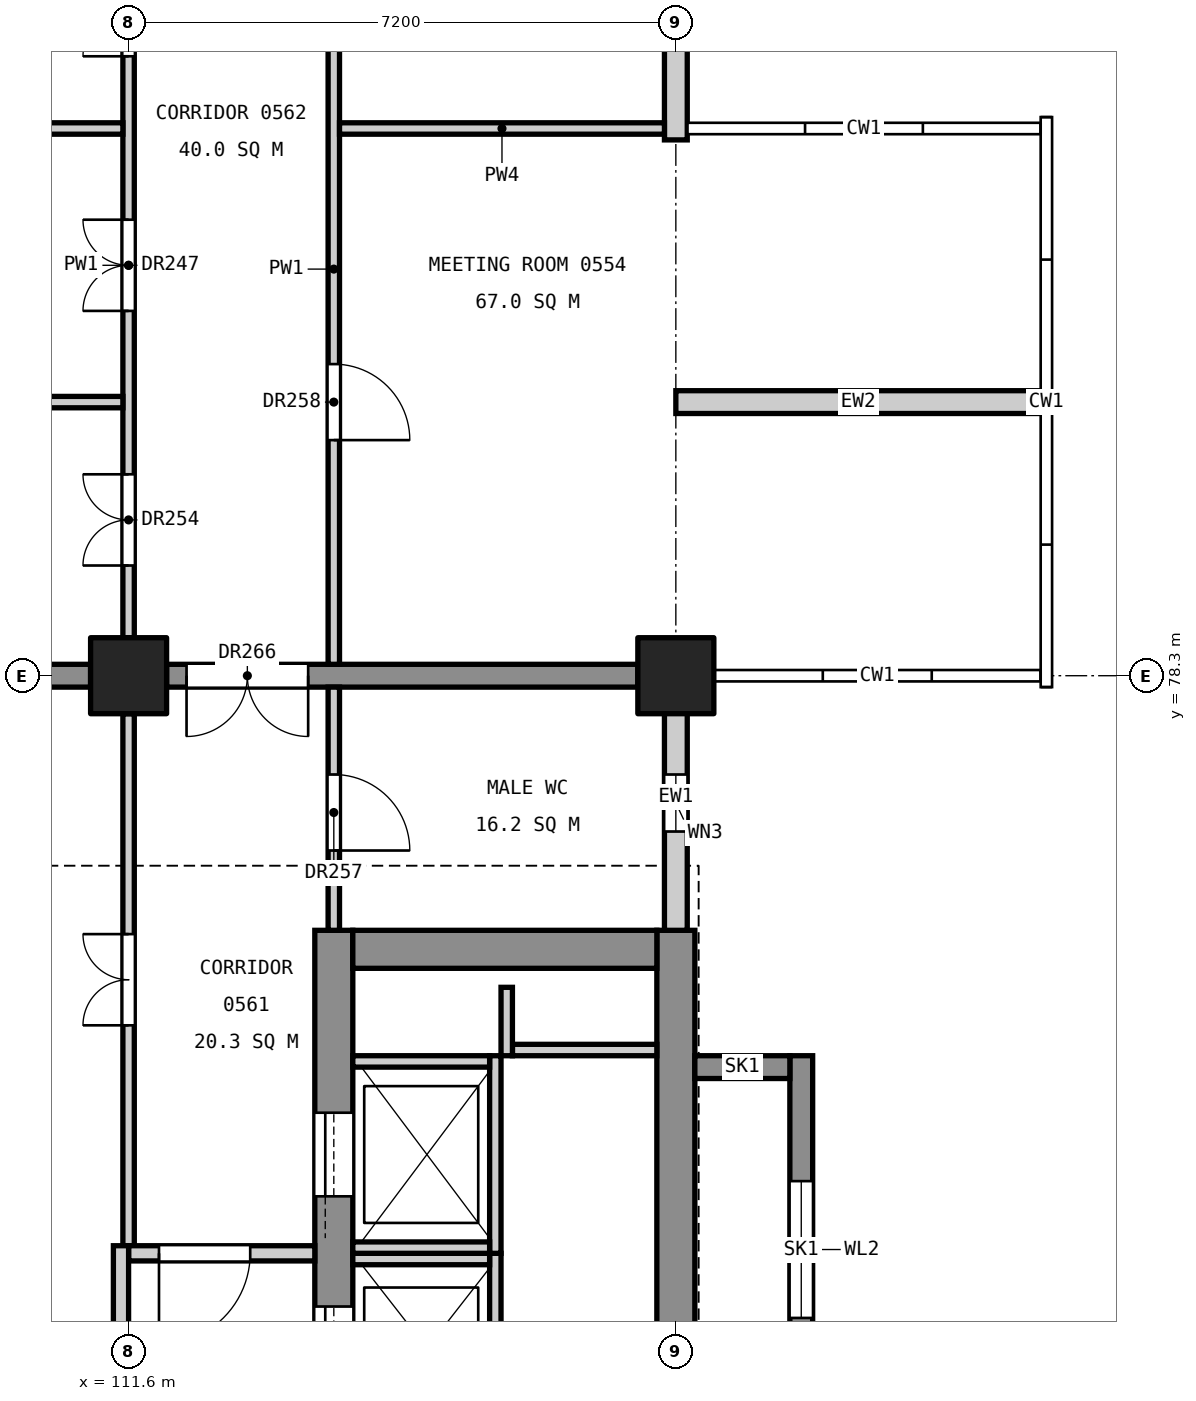
"""IFC4 building model, lengths in metres.
Left out: names, types, materials, properties, quantities, classifications, styles, units other than length and angle.
Written with IfcOpenShell. Run it as: python <this file> out.ifc"""

import sys

from ifc_helpers import new_model, si_unit, direction, frame, frame_2d, origin, origin_2d, place, context, subcontext, project, spatial, rectangle, extrude, element, fill, save


model = new_model("IFC4")
c1 = context("Model", 3, precision=1e-05, world=origin(), true_north=direction((0.0, 1.0)))
c2 = subcontext(c1, "Body", "Model", "MODEL_VIEW")
j1 = project(units=[si_unit("LENGTHUNIT", "METRE"), si_unit("PLANEANGLEUNIT", "RADIAN")], contexts=[c1])
p1 = place(None, origin())
s1 = spatial("IfcSite", under=j1, at=p1, CompositionType="ELEMENT")
p2 = place(p1, origin())
s2 = spatial("IfcBuilding", under=s1, at=p2, CompositionType="ELEMENT")
p3 = place(p2, frame((0.0, 0.0, 27.0)))
s3 = spatial("IfcBuildingStorey", under=s2, at=p3, CompositionType="ELEMENT", Elevation=27.0)
for number, where, z_axis, x_axis in (
    (1, (118.8, 78.3, 0.0), (0.0, 0.0, 1.0), (1.0, 0.0, 0.0)),
    (2, (111.6, 78.3, 0.0), (0.0, 0.0, 1.0), (1.0, 0.0, 0.0)),
):
    element("IfcColumn", number, at=place(p3, frame(where, z_axis=z_axis, x_axis=x_axis)), inside=s3, PredefinedType="COLUMN", context=c2, shape_type="SweptSolid", body=[
        extrude(rectangle(XDim=1.0, YDim=1.0, at=origin_2d()), origin(), (0.0, 0.0, 1.0), 4.8),
    ])
p4 = place(p3, frame((118.8, 60.05, 0.0), z_axis=(0.0, 0.0, 1.0), x_axis=(0.0, 1.0, 0.0)))
e3 = element("IfcWall", 3, at=p4, inside=s3, PredefinedType="SHEAR", context=c2, shape_type="SweptSolid", body=[
    extrude(rectangle(XDim=14.9, YDim=0.5, at=frame_2d((7.45, 0.0))), origin(), (0.0, 0.0, 1.0), 4.55),
])
p5 = place(p4, frame((6.16, 0.0, 3.4)))
e4 = element("IfcOpeningElement", 4, at=p5, cuts=e3, PredefinedType="OPENING", context=c2, shape_type="SweptSolid", body=[
    extrude(rectangle(XDim=1.2, YDim=0.9, at=frame_2d((0.6, 0.45))), frame((0.0, 0.26, 0.0), z_axis=(0.0, -1.0, 0.0), x_axis=(1.0, 0.0, 0.0)), (0.0, 0.0, 1.0), 0.52),
])
p6 = place(p3, frame((114.3, 60.05, 0.0), z_axis=(0.0, 0.0, 1.0), x_axis=(0.0, 1.0, 0.0)))
e5 = element("IfcWall", 5, at=p6, inside=s3, PredefinedType="SHEAR", context=c2, shape_type="SweptSolid", body=[
    extrude(rectangle(XDim=14.9, YDim=0.5, at=frame_2d((7.45, 0.0))), origin(), (0.0, 0.0, 1.0), 4.55),
])
p7 = place(p6, frame((0.55, 0.0, 0.0)))
e6 = element("IfcOpeningElement", 6, at=p7, cuts=e5, PredefinedType="OPENING", context=c2, shape_type="SweptSolid", body=[
    extrude(rectangle(XDim=1.4, YDim=2.1, at=frame_2d((0.7, 1.05))), frame((0.0, 0.26, 0.0), z_axis=(0.0, -1.0, 0.0), x_axis=(1.0, 0.0, 0.0)), (0.0, 0.0, 1.0), 0.52),
])
p8 = place(p6, frame((8.85, 0.0, 0.0)))
e7 = element("IfcOpeningElement", 7, at=p8, cuts=e5, PredefinedType="OPENING", context=c2, shape_type="SweptSolid", body=[
    extrude(rectangle(XDim=1.1, YDim=2.1, at=frame_2d((0.55, 1.05))), frame((0.0, 0.26, 0.0), z_axis=(0.0, -1.0, 0.0), x_axis=(1.0, 0.0, 0.0)), (0.0, 0.0, 1.0), 0.52),
])
p9 = place(p6, frame((11.4, 0.0, 0.0)))
e8 = element("IfcOpeningElement", 8, at=p9, cuts=e5, PredefinedType="OPENING", context=c2, shape_type="SweptSolid", body=[
    extrude(rectangle(XDim=1.1, YDim=2.1, at=frame_2d((0.55, 1.05))), frame((0.0, 0.26, 0.0), z_axis=(0.0, -1.0, 0.0), x_axis=(1.0, 0.0, 0.0)), (0.0, 0.0, 1.0), 0.52),
])
p10 = place(p3, frame((118.55, 74.7, 0.0), z_axis=(0.0, 0.0, 1.0), x_axis=(-1.0, 0.0, 0.0)))
e9 = element("IfcWall", 9, at=p10, inside=s3, PredefinedType="SHEAR", context=c2, shape_type="SweptSolid", body=[
    extrude(rectangle(XDim=4.0, YDim=0.5, at=frame_2d((2.0, 0.0))), origin(), (0.0, 0.0, 1.0), 4.55),
])
p11 = place(p3, frame((120.45, 68.2, 0.0), z_axis=(0.0, 0.0, 1.0), x_axis=(0.0, 1.0, 0.0)))
e10 = element("IfcWall", 10, at=p11, inside=s3, PredefinedType="SHEAR", context=c2, shape_type="SweptSolid", body=[
    extrude(rectangle(XDim=5.1, YDim=0.3, at=frame_2d((2.55, 0.0))), origin(), (0.0, 0.0, 1.0), 4.8),
])
p12 = place(p11, frame((1.65, 0.0, 3.0)))
e11 = element("IfcOpeningElement", 11, at=p12, cuts=e10, PredefinedType="OPENING", context=c2, shape_type="SweptSolid", body=[
    extrude(rectangle(XDim=1.8, YDim=1.2, at=frame_2d((0.9, 0.6))), frame((0.0, 0.16, 0.0), z_axis=(0.0, -1.0, 0.0), x_axis=(1.0, 0.0, 0.0)), (0.0, 0.0, 1.0), 0.32),
])
p13 = place(p3, frame((119.05, 73.15, 0.0), z_axis=(0.0, 0.0, 1.0), x_axis=(1.0, 0.0, 0.0)))
e12 = element("IfcWall", 12, at=p13, inside=s3, PredefinedType="SHEAR", context=c2, shape_type="SweptSolid", body=[
    extrude(rectangle(XDim=1.25, YDim=0.3, at=frame_2d((0.625, 0.0))), origin(), (0.0, 0.0, 1.0), 4.8),
])
p14 = place(p3, frame((118.3, 78.3, 0.0), z_axis=(0.0, 0.0, 1.0), x_axis=(-1.0, 0.0, 0.0)))
e13 = element("IfcWall", 13, at=p14, inside=s3, PredefinedType="SHEAR", context=c2, shape_type="SweptSolid", body=[
    extrude(rectangle(XDim=6.2, YDim=0.3, at=frame_2d((3.1, 0.0))), origin(), (0.0, 0.0, 1.0), 4.55),
])
p15 = place(p14, frame((4.337, 0.0, 0.0)))
e14 = element("IfcOpeningElement", 14, at=p15, cuts=e13, PredefinedType="OPENING", context=c2, shape_type="SweptSolid", body=[
    extrude(rectangle(XDim=1.6, YDim=2.1, at=frame_2d((0.8, 1.05))), frame((0.0, 0.16, 0.0), z_axis=(0.0, -1.0, 0.0), x_axis=(1.0, 0.0, 0.0)), (0.0, 0.0, 1.0), 0.32),
])
p16 = place(p3, frame((111.1, 78.3, 0.0), z_axis=(0.0, 0.0, 1.0), x_axis=(-1.0, 0.0, 0.0)))
e15 = element("IfcWall", 15, at=p16, inside=s3, PredefinedType="SHEAR", context=c2, shape_type="SweptSolid", body=[
    extrude(rectangle(XDim=9.8, YDim=0.3, at=frame_2d((4.9, 0.0))), origin(), (0.0, 0.0, 1.0), 4.55),
])
p17 = place(p3, frame((116.425, 68.2, 0.0), z_axis=(0.0, 0.0, 1.0), x_axis=(0.0, 1.0, 0.0)))
e16 = element("IfcWall", 16, at=p17, inside=s3, PredefinedType="SOLIDWALL", context=c2, shape_type="SweptSolid", body=[
    extrude(rectangle(XDim=2.5, YDim=0.15, at=frame_2d((1.25, 0.0))), origin(), (0.0, 0.0, 1.0), 4.8),
])
p18 = place(p3, frame((116.35, 70.625, 0.0), z_axis=(0.0, 0.0, 1.0), x_axis=(-1.0, 0.0, 0.0)))
e17 = element("IfcWall", 17, at=p18, inside=s3, PredefinedType="SOLIDWALL", context=c2, shape_type="SweptSolid", body=[
    extrude(rectangle(XDim=1.8, YDim=0.15, at=frame_2d((0.9, 0.0))), origin(), (0.0, 0.0, 1.0), 4.8),
])
p19 = place(p3, frame((116.425, 70.7, 0.0), z_axis=(0.0, 0.0, 1.0), x_axis=(0.0, 1.0, 0.0)))
e18 = element("IfcWall", 18, at=p19, inside=s3, PredefinedType="SOLIDWALL", context=c2, shape_type="SweptSolid", body=[
    extrude(rectangle(XDim=2.6, YDim=0.15, at=frame_2d((1.3, 0.0))), origin(), (0.0, 0.0, 1.0), 4.8),
])
for number, where, z_axis, x_axis in (
    (19, (116.35, 70.775, 0.0), (0.0, 0.0, 1.0), (-1.0, 0.0, 0.0)),
    (20, (116.35, 73.225, 0.0), (0.0, 0.0, 1.0), (-1.0, 0.0, 0.0)),
):
    element("IfcWall", number, at=place(p3, frame(where, z_axis=z_axis, x_axis=x_axis)), inside=s3, PredefinedType="SOLIDWALL", context=c2, shape_type="SweptSolid", body=[
        extrude(rectangle(XDim=1.8, YDim=0.15, at=frame_2d((0.9, 0.0))), origin(), (0.0, 0.0, 1.0), 4.8),
    ])
p20 = place(p3, frame((118.55, 73.375, 0.0), z_axis=(0.0, 0.0, 1.0), x_axis=(-1.0, 0.0, 0.0)))
e21 = element("IfcWall", 21, at=p20, inside=s3, PredefinedType="SOLIDWALL", context=c2, shape_type="SweptSolid", body=[
    extrude(rectangle(XDim=1.9, YDim=0.15, at=frame_2d((0.95, 0.0))), origin(), (0.0, 0.0, 1.0), 4.8),
])
p21 = place(p3, frame((116.575, 73.3, 0.0), z_axis=(0.0, 0.0, 1.0), x_axis=(0.0, 1.0, 0.0)))
e22 = element("IfcWall", 22, at=p21, inside=s3, PredefinedType="SOLIDWALL", context=c2, shape_type="SweptSolid", body=[
    extrude(rectangle(XDim=0.9, YDim=0.15, at=frame_2d((0.45, 0.0))), origin(), (0.0, 0.0, 1.0), 4.8),
])
p22 = place(p3, frame((118.8, 74.95, 0.0), z_axis=(0.0, 0.0, 1.0), x_axis=(0.0, 1.0, 0.0)))
e23 = element("IfcWall", 23, at=p22, inside=s3, PredefinedType="STANDARD", context=c2, shape_type="SweptSolid", body=[
    extrude(rectangle(XDim=3.5, YDim=0.3, at=frame_2d((1.75, 0.0))), origin(), (0.0, 0.0, 1.0), 3.65),
])
p23 = place(p22, frame((1.3, 0.0, 0.8)))
e24 = element("IfcOpeningElement", 24, at=p23, cuts=e23, PredefinedType="OPENING", context=c2, shape_type="SweptSolid", body=[
    extrude(rectangle(XDim=0.75, YDim=1.2, at=frame_2d((0.375, 0.6))), frame((0.0, 0.16, 0.0), z_axis=(0.0, -1.0, 0.0), x_axis=(1.0, 0.0, 0.0)), (0.0, 0.0, 1.0), 0.32),
])
p24 = place(p3, frame((118.8, 85.35, 0.0), z_axis=(0.0, 0.0, 1.0), x_axis=(0.0, 1.0, 0.0)))
e25 = element("IfcWall", 25, at=p24, inside=s3, PredefinedType="STANDARD", context=c2, shape_type="SweptSolid", body=[
    extrude(rectangle(XDim=3.5, YDim=0.3, at=frame_2d((1.75, 0.0))), origin(), (0.0, 0.0, 1.0), 3.65),
])
p25 = place(p24, frame((1.45, 0.0, 0.8)))
e26 = element("IfcOpeningElement", 26, at=p25, cuts=e25, PredefinedType="OPENING", context=c2, shape_type="SweptSolid", body=[
    extrude(rectangle(XDim=0.75, YDim=1.2, at=frame_2d((0.375, 0.6))), frame((0.0, 0.16, 0.0), z_axis=(0.0, -1.0, 0.0), x_axis=(1.0, 0.0, 0.0)), (0.0, 0.0, 1.0), 0.32),
])
p26 = place(p3, frame((123.6, 81.9, 0.0), z_axis=(0.0, 0.0, 1.0), x_axis=(-1.0, 0.0, 0.0)))
e27 = element("IfcWall", 27, at=p26, inside=s3, PredefinedType="STANDARD", context=c2, shape_type="SweptSolid", body=[
    extrude(rectangle(XDim=4.8, YDim=0.3, at=frame_2d((2.4, 0.0))), origin(), (0.0, 0.0, 1.0), 3.65),
])
p27 = place(p3, frame((114.3, 74.95, 0.0), z_axis=(0.0, 0.0, 1.0), x_axis=(0.0, 1.0, 0.0)))
e28 = element("IfcWall", 28, at=p27, inside=s3, PredefinedType="PARTITIONING", context=c2, shape_type="SweptSolid", body=[
    extrude(rectangle(XDim=3.2, YDim=0.15, at=frame_2d((1.6, 0.0))), origin(), (0.0, 0.0, 1.0), 3.55),
])
p28 = place(p27, frame((1.05, 0.0, 0.0)))
e29 = element("IfcOpeningElement", 29, at=p28, cuts=e28, PredefinedType="OPENING", context=c2, shape_type="SweptSolid", body=[
    extrude(rectangle(XDim=1.0, YDim=2.1, at=frame_2d((0.5, 1.05))), frame((0.0, 0.085, 0.0), z_axis=(0.0, -1.0, 0.0), x_axis=(1.0, 0.0, 0.0)), (0.0, 0.0, 1.0), 0.17),
])
p29 = place(p3, frame((114.3, 78.45, 0.0), z_axis=(0.0, 0.0, 1.0), x_axis=(0.0, 1.0, 0.0)))
e30 = element("IfcWall", 30, at=p29, inside=s3, PredefinedType="PARTITIONING", context=c2, shape_type="SweptSolid", body=[
    extrude(rectangle(XDim=10.4, YDim=0.15, at=frame_2d((5.2, 0.0))), origin(), (0.0, 0.0, 1.0), 3.55),
])
p30 = place(p29, frame((8.35, 0.0, 0.0)))
e31 = element("IfcOpeningElement", 31, at=p30, cuts=e30, PredefinedType="OPENING", context=c2, shape_type="SweptSolid", body=[
    extrude(rectangle(XDim=1.0, YDim=2.1, at=frame_2d((0.5, 1.05))), frame((0.0, 0.085, 0.0), z_axis=(0.0, -1.0, 0.0), x_axis=(1.0, 0.0, 0.0)), (0.0, 0.0, 1.0), 0.17),
])
p31 = place(p29, frame((2.95, 0.0, 0.0)))
e32 = element("IfcOpeningElement", 32, at=p31, cuts=e30, PredefinedType="OPENING", context=c2, shape_type="SweptSolid", body=[
    extrude(rectangle(XDim=1.0, YDim=2.1, at=frame_2d((0.5, 1.05))), frame((0.0, 0.085, 0.0), z_axis=(0.0, -1.0, 0.0), x_axis=(1.0, 0.0, 0.0)), (0.0, 0.0, 1.0), 0.17),
])
p32 = place(p3, frame((118.65, 85.5, 0.0), z_axis=(0.0, 0.0, 1.0), x_axis=(-1.0, 0.0, 0.0)))
e33 = element("IfcWall", 33, at=p32, inside=s3, PredefinedType="PARTITIONING", context=c2, shape_type="SweptSolid", body=[
    extrude(rectangle(XDim=4.275, YDim=0.15, at=frame_2d((2.137, 0.0))), origin(), (0.0, 0.0, 1.0), 3.85),
])
p33 = place(p3, frame((111.6, 70.8, 0.0), z_axis=(0.0, 0.0, 1.0), x_axis=(0.0, 1.0, 0.0)))
e34 = element("IfcWall", 34, at=p33, inside=s3, PredefinedType="PARTITIONING", context=c2, shape_type="SweptSolid", body=[
    extrude(rectangle(XDim=7.0, YDim=0.15, at=frame_2d((3.5, 0.0))), origin(), (0.0, 0.0, 1.0), 3.55),
])
p34 = place(p33, frame((2.9, 0.0, 0.0)))
e35 = element("IfcOpeningElement", 35, at=p34, cuts=e34, PredefinedType="OPENING", context=c2, shape_type="SweptSolid", body=[
    extrude(rectangle(XDim=1.2, YDim=2.1, at=frame_2d((0.6, 1.05))), frame((0.0, 0.085, 0.0), z_axis=(0.0, -1.0, 0.0), x_axis=(1.0, 0.0, 0.0)), (0.0, 0.0, 1.0), 0.17),
])
p35 = place(p3, frame((111.6, 78.8, 0.0), z_axis=(0.0, 0.0, 1.0), x_axis=(0.0, 1.0, 0.0)))
e36 = element("IfcWall", 36, at=p35, inside=s3, PredefinedType="PARTITIONING", context=c2, shape_type="SweptSolid", body=[
    extrude(rectangle(XDim=9.8, YDim=0.15, at=frame_2d((4.9, 0.0))), origin(), (0.0, 0.0, 1.0), 3.55),
])
p36 = place(p35, frame((4.3, 0.0, 0.0)))
e37 = element("IfcOpeningElement", 37, at=p36, cuts=e36, PredefinedType="OPENING", context=c2, shape_type="SweptSolid", body=[
    extrude(rectangle(XDim=1.2, YDim=2.1, at=frame_2d((0.6, 1.05))), frame((0.0, 0.085, 0.0), z_axis=(0.0, -1.0, 0.0), x_axis=(1.0, 0.0, 0.0)), (0.0, 0.0, 1.0), 0.17),
])
p37 = place(p35, frame((0.95, 0.0, 0.0)))
e38 = element("IfcOpeningElement", 38, at=p37, cuts=e36, PredefinedType="OPENING", context=c2, shape_type="SweptSolid", body=[
    extrude(rectangle(XDim=1.2, YDim=2.1, at=frame_2d((0.6, 1.05))), frame((0.0, 0.085, 0.0), z_axis=(0.0, -1.0, 0.0), x_axis=(1.0, 0.0, 0.0)), (0.0, 0.0, 1.0), 0.17),
])
p38 = place(p35, frame((7.65, 0.0, 0.0)))
e39 = element("IfcOpeningElement", 39, at=p38, cuts=e36, PredefinedType="OPENING", context=c2, shape_type="SweptSolid", body=[
    extrude(rectangle(XDim=1.2, YDim=2.1, at=frame_2d((0.6, 1.05))), frame((0.0, 0.085, 0.0), z_axis=(0.0, -1.0, 0.0), x_axis=(1.0, 0.0, 0.0)), (0.0, 0.0, 1.0), 0.17),
])
p39 = place(p3, frame((114.05, 70.7, 0.0), z_axis=(0.0, 0.0, 1.0), x_axis=(-1.0, 0.0, 0.0)))
e40 = element("IfcWall", 40, at=p39, inside=s3, PredefinedType="PARTITIONING", context=c2, shape_type="SweptSolid", body=[
    extrude(rectangle(XDim=2.45, YDim=0.2, at=frame_2d((1.225, 0.0))), origin(), (0.0, 0.0, 1.0), 3.55),
])
p40 = place(p39, frame((0.85, 0.0, 0.0)))
e41 = element("IfcOpeningElement", 41, at=p40, cuts=e40, PredefinedType="OPENING", context=c2, shape_type="SweptSolid", body=[
    extrude(rectangle(XDim=1.2, YDim=2.1, at=frame_2d((0.6, 1.05))), frame((0.0, 0.11, 0.0), z_axis=(0.0, -1.0, 0.0), x_axis=(1.0, 0.0, 0.0)), (0.0, 0.0, 1.0), 0.22),
])
p41 = place(p3, frame((111.5, 68.0, 0.0), z_axis=(0.0, 0.0, 1.0), x_axis=(0.0, 1.0, 0.0)))
e42 = element("IfcWall", 42, at=p41, inside=s3, PredefinedType="PARTITIONING", context=c2, shape_type="SweptSolid", body=[
    extrude(rectangle(XDim=2.8, YDim=0.2, at=frame_2d((1.4, 0.0))), origin(), (0.0, 0.0, 1.0), 3.55),
])
for number, where, z_axis, x_axis in (
    (43, (111.525, 81.9, 0.0), (0.0, 0.0, 1.0), (-1.0, 0.0, 0.0)),
    (44, (111.525, 85.5, 0.0), (0.0, 0.0, 1.0), (-1.0, 0.0, 0.0)),
):
    element("IfcWall", number, at=place(p3, frame(where, z_axis=z_axis, x_axis=x_axis)), inside=s3, PredefinedType="PARTITIONING", context=c2, shape_type="SweptSolid", body=[
        extrude(rectangle(XDim=10.575, YDim=0.15, at=frame_2d((5.288, 0.0))), origin(), (0.0, 0.0, 1.0), 3.85),
    ])
p42 = place(p8, origin())
e45 = element("IfcDoor", 45, at=p42, inside=s3, OperationType="SLIDING_TO_LEFT", PredefinedType="DOOR", context=c2, shape_type="SweptSolid", body=[
    extrude(rectangle(XDim=1.1, YDim=2.1, at=frame_2d((0.55, 1.05))), frame((0.0, 0.025, 0.0), z_axis=(0.0, -1.0, 0.0), x_axis=(1.0, 0.0, 0.0)), (0.0, 0.0, 1.0), 0.05),
])
fill(e7, e45)
p43 = place(p9, origin())
e46 = element("IfcDoor", 46, at=p43, inside=s3, OperationType="SLIDING_TO_LEFT", PredefinedType="DOOR", context=c2, shape_type="SweptSolid", body=[
    extrude(rectangle(XDim=1.1, YDim=2.1, at=frame_2d((0.55, 1.05))), frame((0.0, 0.025, 0.0), z_axis=(0.0, -1.0, 0.0), x_axis=(1.0, 0.0, 0.0)), (0.0, 0.0, 1.0), 0.05),
])
fill(e8, e46)
p44 = place(p23, origin())
e47 = element("IfcWindow", 47, at=p44, inside=s3, PartitioningType="SINGLE_PANEL", PredefinedType="WINDOW", context=c2, shape_type="SweptSolid", body=[
    extrude(rectangle(XDim=0.75, YDim=1.2, at=frame_2d((0.375, 0.6))), frame((0.0, 0.03, 0.0), z_axis=(0.0, -1.0, 0.0), x_axis=(1.0, 0.0, 0.0)), (0.0, 0.0, 1.0), 0.06),
])
fill(e24, e47)
p45 = place(p12, origin())
e48 = element("IfcWindow", 48, at=p45, inside=s3, PartitioningType="SINGLE_PANEL", PredefinedType="WINDOW", context=c2, shape_type="SweptSolid", body=[
    extrude(rectangle(XDim=1.8, YDim=1.2, at=frame_2d((0.9, 0.6))), frame((0.0, 0.03, 0.0), z_axis=(0.0, -1.0, 0.0), x_axis=(1.0, 0.0, 0.0)), (0.0, 0.0, 1.0), 0.06),
])
fill(e11, e48)
p46 = place(p36, origin())
e49 = element("IfcDoor", 49, at=p46, inside=s3, OperationType="DOUBLE_DOOR_SINGLE_SWING", PredefinedType="DOOR", context=c2, shape_type="SweptSolid", body=[
    extrude(rectangle(XDim=1.2, YDim=2.1, at=frame_2d((0.6, 1.05))), frame((0.0, 0.025, 0.0), z_axis=(0.0, -1.0, 0.0), x_axis=(1.0, 0.0, 0.0)), (0.0, 0.0, 1.0), 0.05),
])
fill(e37, e49)
p47 = place(p34, origin())
e50 = element("IfcDoor", 50, at=p47, inside=s3, OperationType="DOUBLE_DOOR_SINGLE_SWING", PredefinedType="DOOR", context=c2, shape_type="SweptSolid", body=[
    extrude(rectangle(XDim=1.2, YDim=2.1, at=frame_2d((0.6, 1.05))), frame((0.0, 0.025, 0.0), z_axis=(0.0, -1.0, 0.0), x_axis=(1.0, 0.0, 0.0)), (0.0, 0.0, 1.0), 0.05),
])
fill(e35, e50)
p48 = place(p37, origin())
e51 = element("IfcDoor", 51, at=p48, inside=s3, OperationType="DOUBLE_DOOR_SINGLE_SWING", PredefinedType="DOOR", context=c2, shape_type="SweptSolid", body=[
    extrude(rectangle(XDim=1.2, YDim=2.1, at=frame_2d((0.6, 1.05))), frame((0.0, 0.025, 0.0), z_axis=(0.0, -1.0, 0.0), x_axis=(1.0, 0.0, 0.0)), (0.0, 0.0, 1.0), 0.05),
])
fill(e38, e51)
p49 = place(p38, origin())
e52 = element("IfcDoor", 52, at=p49, inside=s3, OperationType="DOUBLE_DOOR_SINGLE_SWING", PredefinedType="DOOR", context=c2, shape_type="SweptSolid", body=[
    extrude(rectangle(XDim=1.2, YDim=2.1, at=frame_2d((0.6, 1.05))), frame((0.0, 0.025, 0.0), z_axis=(0.0, -1.0, 0.0), x_axis=(1.0, 0.0, 0.0)), (0.0, 0.0, 1.0), 0.05),
])
fill(e39, e52)
p50 = place(p28, frame((1.0, 0.0, 0.0), z_axis=(0.0, 0.0, 1.0), x_axis=(-1.0, 0.0, 0.0)))
e53 = element("IfcDoor", 53, at=p50, inside=s3, OperationType="SINGLE_SWING_RIGHT", PredefinedType="DOOR", context=c2, shape_type="SweptSolid", body=[
    extrude(rectangle(XDim=1.0, YDim=2.1, at=frame_2d((0.5, 1.05))), frame((0.0, 0.025, 0.0), z_axis=(0.0, -1.0, 0.0), x_axis=(1.0, 0.0, 0.0)), (0.0, 0.0, 1.0), 0.05),
])
fill(e29, e53)
p51 = place(p31, frame((1.0, 0.0, 0.0), z_axis=(0.0, 0.0, 1.0), x_axis=(-1.0, 0.0, 0.0)))
e54 = element("IfcDoor", 54, at=p51, inside=s3, OperationType="SINGLE_SWING_RIGHT", PredefinedType="DOOR", context=c2, shape_type="SweptSolid", body=[
    extrude(rectangle(XDim=1.0, YDim=2.1, at=frame_2d((0.5, 1.05))), frame((0.0, 0.025, 0.0), z_axis=(0.0, -1.0, 0.0), x_axis=(1.0, 0.0, 0.0)), (0.0, 0.0, 1.0), 0.05),
])
fill(e32, e54)
p52 = place(p40, origin())
e55 = element("IfcDoor", 55, at=p52, inside=s3, OperationType="SINGLE_SWING_RIGHT", PredefinedType="DOOR", context=c2, shape_type="SweptSolid", body=[
    extrude(rectangle(XDim=1.2, YDim=2.1, at=frame_2d((0.6, 1.05))), frame((0.0, 0.025, 0.0), z_axis=(0.0, -1.0, 0.0), x_axis=(1.0, 0.0, 0.0)), (0.0, 0.0, 1.0), 0.05),
])
fill(e41, e55)
p53 = place(p15, origin())
e56 = element("IfcDoor", 56, at=p53, inside=s3, OperationType="DOUBLE_DOOR_SINGLE_SWING", PredefinedType="DOOR", context=c2, shape_type="SweptSolid", body=[
    extrude(rectangle(XDim=1.6, YDim=2.1, at=frame_2d((0.8, 1.05))), frame((0.0, 0.025, 0.0), z_axis=(0.0, -1.0, 0.0), x_axis=(1.0, 0.0, 0.0)), (0.0, 0.0, 1.0), 0.05),
])
fill(e14, e56)
save(model, sys.argv[1])
